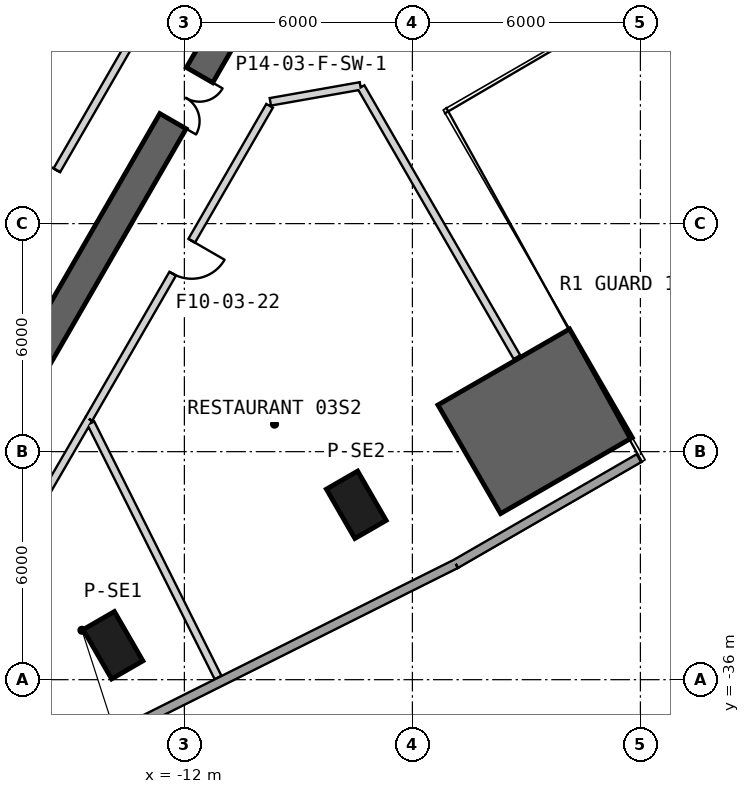
"""IFC4 building model, lengths in metres.
Left out: names, types, materials, properties, quantities, classifications, styles, units other than length and angle.
Written with IfcOpenShell. Run it as: python <this file> out.ifc"""

import sys

from ifc_helpers import new_model, si_unit, direction, frame, frame_2d, origin, origin_2d, place, context, subcontext, project, spatial, polyline, rectangle, outline, extrude, element, fill, save


model = new_model("IFC4")
c1 = context("Model", 3, precision=1e-05, world=origin(), true_north=direction((0.0, 1.0)))
c2 = subcontext(c1, "Body", "Model", "MODEL_VIEW")
j1 = project(units=[si_unit("LENGTHUNIT", "METRE"), si_unit("PLANEANGLEUNIT", "RADIAN")], contexts=[c1])
p1 = place(None, origin())
s1 = spatial("IfcSite", under=j1, at=p1, CompositionType="ELEMENT")
p2 = place(p1, origin())
s2 = spatial("IfcBuilding", under=s1, at=p2, CompositionType="ELEMENT")
p3 = place(p2, frame((0.0, 0.0, 21.5)))
s3 = spatial("IfcBuildingStorey", under=s2, at=p3, CompositionType="ELEMENT", Elevation=21.5)
for number, where, z_axis, x_axis in (
    (1, (-13.878, -35.094, 0.0), (0.0, 0.0, 1.0), (0.5, -0.866, 0.0)),
    (2, (-7.477, -31.398, 0.0), (0.0, 0.0, 1.0), (0.5, -0.866, 0.0)),
):
    element("IfcColumn", number, at=place(p3, frame(where, z_axis=z_axis, x_axis=x_axis)), inside=s3, PredefinedType="COLUMN", context=c2, shape_type="SweptSolid", body=[
        extrude(rectangle(XDim=1.5, YDim=0.95, at=origin_2d()), origin(), (0.0, 0.0, 1.0), 6.0),
    ])
p4 = place(p3, frame((-10.575, -18.316, 0.0), z_axis=(0.0, 0.0, 1.0), x_axis=(-0.499996575515, -0.866027380903, 0.0)))
e3 = element("IfcWall", 3, at=p4, inside=s3, PredefinedType="SHEAR", context=c2, shape_type="SweptSolid", body=[
    extrude(rectangle(XDim=13.954, YDim=0.8, at=frame_2d((6.977, 0.0))), origin(), (0.0, 0.0, 1.0), 6.0),
])
p5 = place(p4, frame((2.05, 0.0, 0.0)))
e4 = element("IfcOpeningElement", 4, at=p5, cuts=e3, PredefinedType="OPENING", context=c2, shape_type="SweptSolid", body=[
    extrude(rectangle(XDim=1.4, YDim=2.4, at=frame_2d((0.7, 1.2))), frame((0.0, 0.41, 0.0), z_axis=(0.0, -1.0, 0.0), x_axis=(1.0, 0.0, 0.0)), (0.0, 0.0, 1.0), 0.82),
])
p6 = place(p3, origin())
e5 = element("IfcWall", 5, at=p6, inside=s3, PredefinedType="SHEAR", context=c2, shape_type="SweptSolid", body=[
    extrude(outline(polyline([(-3.678, -31.63), (-0.214, -29.63), (-1.864, -26.772), (-5.328, -28.772), (-3.678, -31.63)])), origin(), (0.0, 0.0, 1.0), 6.0),
])
p7 = place(p3, frame((-17.203, -39.128, 0.0), z_axis=(0.0, 0.0, 1.0), x_axis=(0.894377655106, 0.447312653573, 0.0)))
e6 = element("IfcWall", 6, at=p7, inside=s3, PredefinedType="SOLIDWALL", context=c2, shape_type="SweptSolid", body=[
    extrude(rectangle(XDim=13.802, YDim=0.24, at=frame_2d((6.901, 0.0))), origin(), (0.0, 0.0, 1.0), 5.7),
])
p8 = place(p3, frame((-4.859, -32.954, 0.0), z_axis=(0.0, 0.0, 1.0), x_axis=(0.865999312459, 0.500045188778, 0.0)))
e7 = element("IfcWall", 7, at=p8, inside=s3, PredefinedType="SOLIDWALL", context=c2, shape_type="SweptSolid", body=[
    extrude(rectangle(XDim=5.566, YDim=0.24, at=frame_2d((2.783, 0.0))), origin(), (0.0, 0.0, 1.0), 5.7),
])
p9 = place(p3, frame((-17.98, -27.143, 0.0), z_axis=(0.0, 0.0, 1.0), x_axis=(0.499987665054, 0.866032525252, 0.0)))
e8 = element("IfcWall", 8, at=p9, inside=s3, PredefinedType="PARTITIONING", context=c2, shape_type="SweptSolid", body=[
    extrude(rectangle(XDim=9.695, YDim=0.2, at=frame_2d((4.848, 0.0))), origin(), (0.0, 0.0, 1.0), 5.7),
])
p10 = place(p9, frame((4.249, 0.0, 0.0)))
e9 = element("IfcOpeningElement", 9, at=p10, cuts=e8, PredefinedType="OPENING", context=c2, shape_type="SweptSolid", body=[
    extrude(rectangle(XDim=1.0, YDim=2.1, at=frame_2d((0.5, 1.05))), frame((0.0, 0.11, 0.0), z_axis=(0.0, -1.0, 0.0), x_axis=(1.0, 0.0, 0.0)), (0.0, 0.0, 1.0), 0.22),
])
p11 = place(p3, frame((-14.514, -29.139, 0.0), z_axis=(0.0, 0.0, 1.0), x_axis=(-0.502061989067, -0.864831636294, 0.0)))
e10 = element("IfcWall", 10, at=p11, inside=s3, PredefinedType="PARTITIONING", context=c2, shape_type="SweptSolid", body=[
    extrude(rectangle(XDim=11.855, YDim=0.2, at=frame_2d((5.928, 0.0))), origin(), (0.0, 0.0, 1.0), 5.7),
])
p12 = place(p11, frame((5.421, 0.0, 0.0)))
e11 = element("IfcOpeningElement", 11, at=p12, cuts=e10, PredefinedType="OPENING", context=c2, shape_type="SweptSolid", body=[
    extrude(rectangle(XDim=1.0, YDim=2.1, at=frame_2d((0.5, 1.05))), frame((0.0, 0.11, 0.0), z_axis=(0.0, -1.0, 0.0), x_axis=(1.0, 0.0, 0.0)), (0.0, 0.0, 1.0), 0.22),
])
p13 = place(p3, frame((-9.738, -20.796, 0.0), z_axis=(0.0, 0.0, 1.0), x_axis=(0.984780494406, 0.173802698013, 0.0)))
e12 = element("IfcWall", 12, at=p13, inside=s3, PredefinedType="PARTITIONING", context=c2, shape_type="SweptSolid", body=[
    extrude(rectangle(XDim=2.406, YDim=0.2, at=frame_2d((1.203, 0.0))), origin(), (0.0, 0.0, 1.0), 4.78),
])
p14 = place(p3, frame((-9.758, -20.901, 0.0), z_axis=(0.0, 0.0, 1.0), x_axis=(-0.499997931106, -0.866026598257, 0.0)))
e13 = element("IfcWall", 13, at=p14, inside=s3, PredefinedType="PARTITIONING", context=c2, shape_type="SweptSolid", body=[
    extrude(rectangle(XDim=9.513, YDim=0.2, at=frame_2d((4.756, 0.0))), origin(), (0.0, 0.0, 1.0), 5.7),
])
p15 = place(p14, frame((4.1, 0.0, 0.0)))
e14 = element("IfcOpeningElement", 14, at=p15, cuts=e13, PredefinedType="OPENING", context=c2, shape_type="SweptSolid", body=[
    extrude(rectangle(XDim=1.0, YDim=2.1, at=frame_2d((0.5, 1.05))), frame((0.0, 0.11, 0.0), z_axis=(0.0, -1.0, 0.0), x_axis=(1.0, 0.0, 0.0)), (0.0, 0.0, 1.0), 0.22),
])
p16 = place(p3, frame((-7.35, -20.409, 0.0), z_axis=(0.0, 0.0, 1.0), x_axis=(0.500015278874, -0.866016582343, 0.0)))
e15 = element("IfcWall", 15, at=p16, inside=s3, PredefinedType="PARTITIONING", context=c2, shape_type="SweptSolid", body=[
    extrude(rectangle(XDim=8.203, YDim=0.2, at=frame_2d((4.102, 0.0))), origin(), (0.0, 0.0, 1.0), 5.07),
])
p17 = place(p3, frame((-14.462, -29.248, 0.0), z_axis=(0.0, 0.0, 1.0), x_axis=(0.447304919826, -0.894381523009, 0.0)))
e16 = element("IfcWall", 16, at=p17, inside=s3, PredefinedType="PARTITIONING", context=c2, shape_type="SweptSolid", body=[
    extrude(rectangle(XDim=7.485, YDim=0.2, at=frame_2d((3.743, 0.0))), origin(), (0.0, 0.0, 1.0), 4.78),
])
p18 = place(p10, origin())
e17 = element("IfcDoor", 17, at=p18, inside=s3, OperationType="SINGLE_SWING_RIGHT", PredefinedType="USERDEFINED", context=c2, shape_type="SweptSolid", body=[
    extrude(rectangle(XDim=1.0, YDim=2.1, at=frame_2d((0.5, 1.05))), frame((0.0, 0.025, 0.0), z_axis=(0.0, -1.0, 0.0), x_axis=(1.0, 0.0, 0.0)), (0.0, 0.0, 1.0), 0.05),
])
fill(e9, e17)
p19 = place(p15, origin())
e18 = element("IfcDoor", 18, at=p19, inside=s3, OperationType="SINGLE_SWING_LEFT", PredefinedType="USERDEFINED", context=c2, shape_type="SweptSolid", body=[
    extrude(rectangle(XDim=1.0, YDim=2.1, at=frame_2d((0.5, 1.05))), frame((0.0, 0.025, 0.0), z_axis=(0.0, -1.0, 0.0), x_axis=(1.0, 0.0, 0.0)), (0.0, 0.0, 1.0), 0.05),
])
fill(e14, e18)
p20 = place(p5, origin())
e19 = element("IfcDoor", 19, at=p20, inside=s3, OperationType="DOUBLE_DOOR_SINGLE_SWING", PredefinedType="NOTDEFINED", context=c2, shape_type="SweptSolid", body=[
    extrude(rectangle(XDim=1.4, YDim=2.4, at=frame_2d((0.7, 1.2))), frame((0.0, 0.025, 0.0), z_axis=(0.0, -1.0, 0.0), x_axis=(1.0, 0.0, 0.0)), (0.0, 0.0, 1.0), 0.05),
])
fill(e4, e19)
save(model, sys.argv[1])
